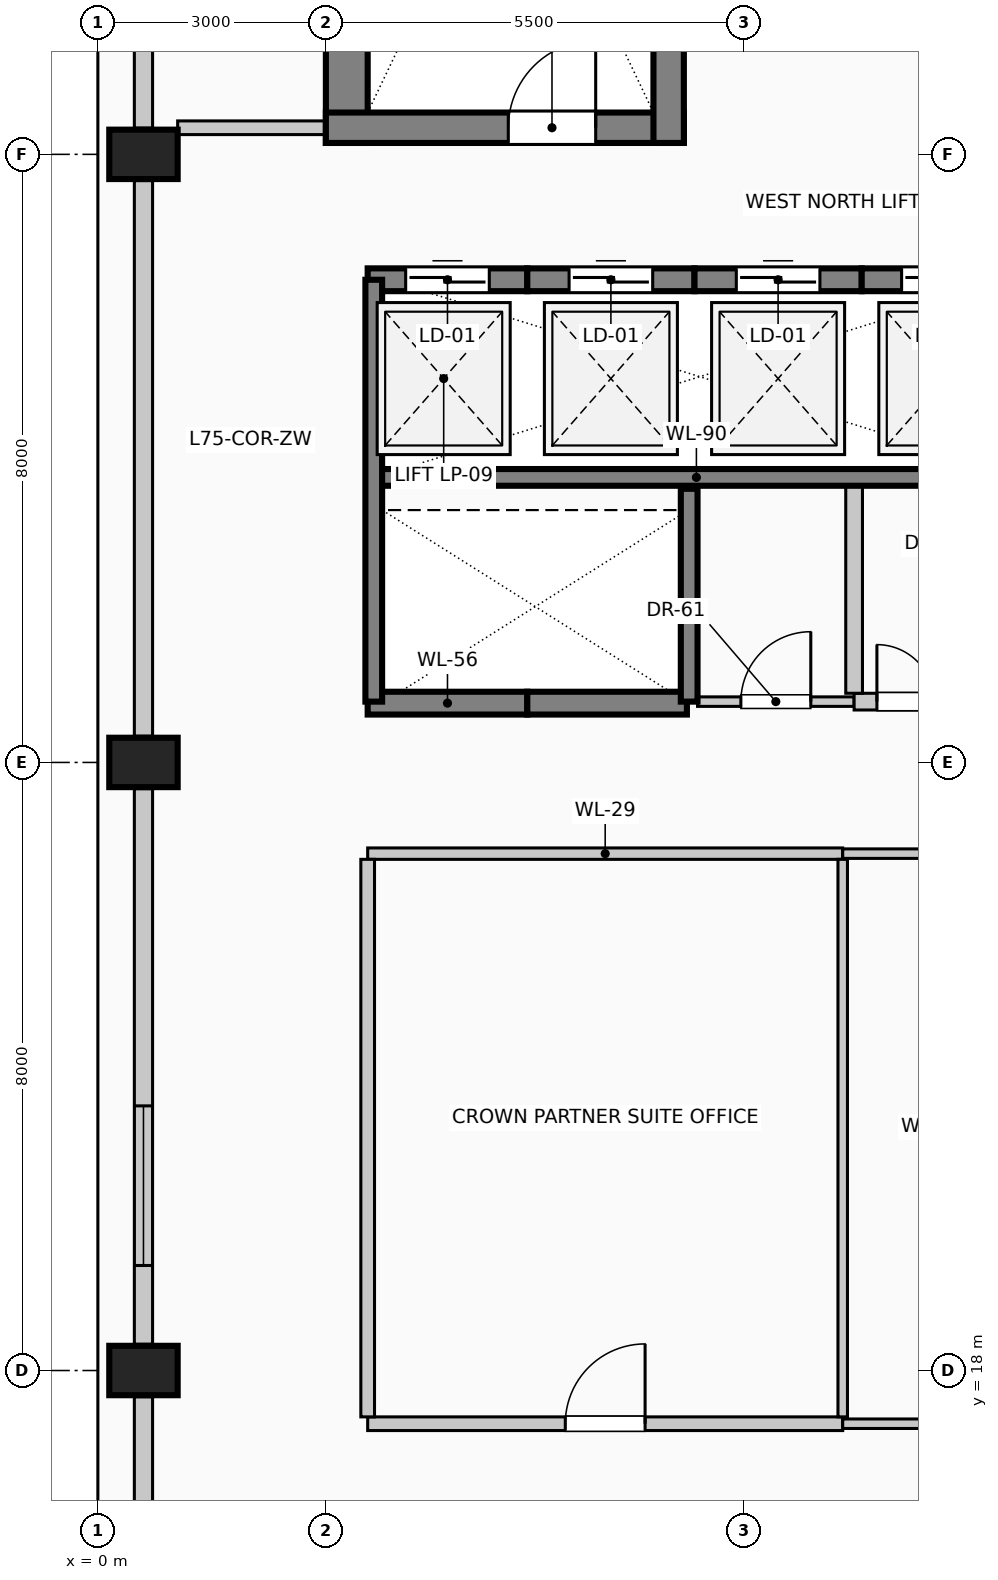
"""IFC4 building model, lengths in metres.
Left out: names, types, materials, properties, quantities, classifications, styles, units other than length and angle.
Written with IfcOpenShell. Run it as: python <this file> out.ifc"""

import sys

from ifc_helpers import new_model, si_unit, direction, frame, frame_2d, origin, origin_2d, place, context, subcontext, project, spatial, rectangle, extrude, element, fill, save


model = new_model("IFC4")
c1 = context("Model", 3, precision=1e-05, world=origin(), true_north=direction((0.0, 1.0)))
c2 = subcontext(c1, "Body", "Model", "MODEL_VIEW")
j1 = project(units=[si_unit("LENGTHUNIT", "METRE"), si_unit("PLANEANGLEUNIT", "RADIAN")], contexts=[c1])
p1 = place(None, origin())
s1 = spatial("IfcSite", under=j1, at=p1, CompositionType="ELEMENT")
p2 = place(p1, origin())
s2 = spatial("IfcBuilding", under=s1, at=p2, CompositionType="ELEMENT")
p3 = place(p2, frame((0.0, 0.0, 309.0)))
s3 = spatial("IfcBuildingStorey", under=s2, at=p3, CompositionType="ELEMENT", Elevation=309.0)
p4 = place(p3, frame((3.275, 34.15, 0.0), z_axis=(0.0, 0.0, 1.0), x_axis=(0.0, 1.0, 0.0)))
e1 = element("IfcWall", 1, at=p4, inside=s3, PredefinedType="SHEAR", context=c2, shape_type="SweptSolid", body=[
    extrude(rectangle(XDim=8.83, YDim=0.55, at=frame_2d((4.415, 0.0))), origin(), (0.0, 0.0, 1.0), 4.0),
])
p5 = place(p3, frame((3.0, 34.35, 0.0), z_axis=(0.0, 0.0, 1.0), x_axis=(1.0, 0.0, 0.0)))
e2 = element("IfcWall", 2, at=p5, inside=s3, PredefinedType="SHEAR", context=c2, shape_type="SweptSolid", body=[
    extrude(rectangle(XDim=4.71, YDim=0.4, at=frame_2d((2.355, 0.0))), origin(), (0.0, 0.0, 1.0), 4.0),
])
p6 = place(p5, frame((2.4, 0.0, 0.0)))
e3 = element("IfcOpeningElement", 3, at=p6, cuts=e2, PredefinedType="OPENING", context=c2, shape_type="SweptSolid", body=[
    extrude(rectangle(XDim=1.15, YDim=2.2, at=frame_2d((0.575, 1.1))), frame((0.0, 0.21, 0.0), z_axis=(0.0, -1.0, 0.0), x_axis=(1.0, 0.0, 0.0)), (0.0, 0.0, 1.0), 0.42),
])
p7 = place(p3, frame((7.51, 34.15, 0.0), z_axis=(0.0, 0.0, 1.0), x_axis=(0.0, 1.0, 0.0)))
e4 = element("IfcWall", 4, at=p7, inside=s3, PredefinedType="SHEAR", context=c2, shape_type="SweptSolid", body=[
    extrude(rectangle(XDim=8.83, YDim=0.4, at=frame_2d((4.415, 0.0))), origin(), (0.0, 0.0, 1.0), 4.0),
])
for number, where, z_axis, x_axis in (
    (5, (0.6, 18.0, 0.0), (0.0, 0.0, 1.0), (0.0, 1.0, 0.0)),
    (6, (0.6, 26.0, 0.0), (0.0, 0.0, 1.0), (0.0, 1.0, 0.0)),
    (7, (0.6, 34.0, 0.0), (0.0, 0.0, 1.0), (0.0, 1.0, 0.0)),
):
    element("IfcColumn", number, at=place(p3, frame(where, z_axis=z_axis, x_axis=x_axis)), inside=s3, PredefinedType="COLUMN", context=c2, shape_type="SweptSolid", body=[
        extrude(rectangle(XDim=0.65, YDim=0.9, at=origin_2d()), origin(), (0.0, 0.0, 1.0), 4.0),
    ])
p8 = place(p3, frame((0.6, 10.345, 0.0), z_axis=(0.0, 0.0, 1.0), x_axis=(0.0, 1.0, 0.0)))
e8 = element("IfcWall", 8, at=p8, inside=s3, PredefinedType="SOLIDWALL", context=c2, shape_type="SweptSolid", body=[
    extrude(rectangle(XDim=7.31, YDim=0.24, at=frame_2d((3.655, 0.0))), origin(), (0.0, 0.0, 1.0), 3.025),
])
p9 = place(p8, frame((1.037, 0.0, 0.35)))
e9 = element("IfcOpeningElement", 9, at=p9, cuts=e8, PredefinedType="OPENING", context=c2, shape_type="SweptSolid", body=[
    extrude(rectangle(XDim=2.1, YDim=2.2, at=frame_2d((1.05, 1.1))), frame((0.0, 0.13, 0.0), z_axis=(0.0, -1.0, 0.0), x_axis=(1.0, 0.0, 0.0)), (0.0, 0.0, 1.0), 0.26),
])
p10 = place(p3, frame((0.6, 18.345, 0.0), z_axis=(0.0, 0.0, 1.0), x_axis=(0.0, 1.0, 0.0)))
e10 = element("IfcWall", 10, at=p10, inside=s3, PredefinedType="SOLIDWALL", context=c2, shape_type="SweptSolid", body=[
    extrude(rectangle(XDim=7.31, YDim=0.24, at=frame_2d((3.655, 0.0))), origin(), (0.0, 0.0, 1.0), 3.025),
])
p11 = place(p10, frame((1.037, 0.0, 0.35)))
e11 = element("IfcOpeningElement", 11, at=p11, cuts=e10, PredefinedType="OPENING", context=c2, shape_type="SweptSolid", body=[
    extrude(rectangle(XDim=2.1, YDim=2.2, at=frame_2d((1.05, 1.1))), frame((0.0, 0.13, 0.0), z_axis=(0.0, -1.0, 0.0), x_axis=(1.0, 0.0, 0.0)), (0.0, 0.0, 1.0), 0.26),
])
p12 = place(p3, frame((0.6, 26.345, 0.0), z_axis=(0.0, 0.0, 1.0), x_axis=(0.0, 1.0, 0.0)))
e12 = element("IfcWall", 12, at=p12, inside=s3, PredefinedType="SOLIDWALL", context=c2, shape_type="SweptSolid", body=[
    extrude(rectangle(XDim=7.31, YDim=0.24, at=frame_2d((3.655, 0.0))), origin(), (0.0, 0.0, 1.0), 3.025),
])
p13 = place(p3, frame((0.6, 34.345, 0.0), z_axis=(0.0, 0.0, 1.0), x_axis=(0.0, 1.0, 0.0)))
e13 = element("IfcWall", 13, at=p13, inside=s3, PredefinedType="SOLIDWALL", context=c2, shape_type="SweptSolid", body=[
    extrude(rectangle(XDim=7.71, YDim=0.24, at=frame_2d((3.855, 0.0))), origin(), (0.0, 0.0, 1.0), 3.025),
])
p14 = place(p3, frame((3.55, 32.35, 0.0), z_axis=(0.0, 0.0, 1.0), x_axis=(1.0, 0.0, 0.0)))
e14 = element("IfcWall", 14, at=p14, inside=s3, PredefinedType="SOLIDWALL", context=c2, shape_type="SweptSolid", body=[
    extrude(rectangle(XDim=2.1, YDim=0.3, at=frame_2d((1.05, 0.0))), origin(), (0.0, 0.0, 1.0), 4.0),
])
p15 = place(p14, frame((0.5, 0.0, 0.0)))
e15 = element("IfcOpeningElement", 15, at=p15, cuts=e14, PredefinedType="OPENING", context=c2, shape_type="SweptSolid", body=[
    extrude(rectangle(XDim=1.1, YDim=2.2, at=frame_2d((0.55, 1.1))), frame((0.0, 0.16, 0.0), z_axis=(0.0, -1.0, 0.0), x_axis=(1.0, 0.0, 0.0)), (0.0, 0.0, 1.0), 0.32),
])
p16 = place(p3, frame((5.65, 32.35, 0.0), z_axis=(0.0, 0.0, 1.0), x_axis=(1.0, 0.0, 0.0)))
e16 = element("IfcWall", 16, at=p16, inside=s3, PredefinedType="SOLIDWALL", context=c2, shape_type="SweptSolid", body=[
    extrude(rectangle(XDim=2.2, YDim=0.3, at=frame_2d((1.1, 0.0))), origin(), (0.0, 0.0, 1.0), 4.0),
])
p17 = place(p16, frame((0.55, 0.0, 0.0)))
e17 = element("IfcOpeningElement", 17, at=p17, cuts=e16, PredefinedType="OPENING", context=c2, shape_type="SweptSolid", body=[
    extrude(rectangle(XDim=1.1, YDim=2.2, at=frame_2d((0.55, 1.1))), frame((0.0, 0.16, 0.0), z_axis=(0.0, -1.0, 0.0), x_axis=(1.0, 0.0, 0.0)), (0.0, 0.0, 1.0), 0.32),
])
p18 = place(p3, frame((7.85, 32.35, 0.0), z_axis=(0.0, 0.0, 1.0), x_axis=(1.0, 0.0, 0.0)))
e18 = element("IfcWall", 18, at=p18, inside=s3, PredefinedType="SOLIDWALL", context=c2, shape_type="SweptSolid", body=[
    extrude(rectangle(XDim=2.2, YDim=0.3, at=frame_2d((1.1, 0.0))), origin(), (0.0, 0.0, 1.0), 4.0),
])
p19 = place(p18, frame((0.55, 0.0, 0.0)))
e19 = element("IfcOpeningElement", 19, at=p19, cuts=e18, PredefinedType="OPENING", context=c2, shape_type="SweptSolid", body=[
    extrude(rectangle(XDim=1.1, YDim=2.2, at=frame_2d((0.55, 1.1))), frame((0.0, 0.16, 0.0), z_axis=(0.0, -1.0, 0.0), x_axis=(1.0, 0.0, 0.0)), (0.0, 0.0, 1.0), 0.32),
])
p20 = place(p3, frame((10.05, 32.35, 0.0), z_axis=(0.0, 0.0, 1.0), x_axis=(1.0, 0.0, 0.0)))
e20 = element("IfcWall", 20, at=p20, inside=s3, PredefinedType="SOLIDWALL", context=c2, shape_type="SweptSolid", body=[
    extrude(rectangle(XDim=2.15, YDim=0.3, at=frame_2d((1.075, 0.0))), origin(), (0.0, 0.0, 1.0), 4.0),
])
p21 = place(p20, frame((0.525, 0.0, 0.0)))
e21 = element("IfcOpeningElement", 21, at=p21, cuts=e20, PredefinedType="OPENING", context=c2, shape_type="SweptSolid", body=[
    extrude(rectangle(XDim=1.1, YDim=2.2, at=frame_2d((0.55, 1.1))), frame((0.0, 0.16, 0.0), z_axis=(0.0, -1.0, 0.0), x_axis=(1.0, 0.0, 0.0)), (0.0, 0.0, 1.0), 0.32),
])
p22 = place(p3, frame((5.65, 26.78, 0.0), z_axis=(0.0, 0.0, 1.0), x_axis=(-1.0, 0.0, 0.0)))
e22 = element("IfcWall", 22, at=p22, inside=s3, PredefinedType="SOLIDWALL", context=c2, shape_type="SweptSolid", body=[
    extrude(rectangle(XDim=2.1, YDim=0.3, at=frame_2d((1.05, 0.0))), origin(), (0.0, 0.0, 1.0), 4.0),
])
p23 = place(p3, frame((7.75, 26.78, 0.0), z_axis=(0.0, 0.0, 1.0), x_axis=(-1.0, 0.0, 0.0)))
e23 = element("IfcWall", 23, at=p23, inside=s3, PredefinedType="SOLIDWALL", context=c2, shape_type="SweptSolid", body=[
    extrude(rectangle(XDim=2.1, YDim=0.3, at=frame_2d((1.05, 0.0))), origin(), (0.0, 0.0, 1.0), 4.0),
])
p24 = place(p3, frame((3.55, 29.75, 0.0), z_axis=(0.0, 0.0, 1.0), x_axis=(1.0, 0.0, 0.0)))
e24 = element("IfcWall", 24, at=p24, inside=s3, PredefinedType="SOLIDWALL", context=c2, shape_type="SweptSolid", body=[
    extrude(rectangle(XDim=8.65, YDim=0.22, at=frame_2d((4.325, 0.0))), origin(), (0.0, 0.0, 1.0), 4.0),
])
p25 = place(p3, frame((3.63, 26.8, 0.0), z_axis=(0.0, 0.0, 1.0), x_axis=(0.0, 1.0, 0.0)))
e25 = element("IfcWall", 25, at=p25, inside=s3, PredefinedType="SOLIDWALL", context=c2, shape_type="SweptSolid", body=[
    extrude(rectangle(XDim=5.55, YDim=0.22, at=frame_2d((2.775, 0.0))), origin(), (0.0, 0.0, 1.0), 4.0),
])
p26 = place(p3, frame((7.78, 26.8, 0.0), z_axis=(0.0, 0.0, 1.0), x_axis=(0.0, 1.0, 0.0)))
e26 = element("IfcWall", 26, at=p26, inside=s3, PredefinedType="SOLIDWALL", context=c2, shape_type="SweptSolid", body=[
    extrude(rectangle(XDim=2.8, YDim=0.22, at=frame_2d((1.4, 0.0))), origin(), (0.0, 0.0, 1.0), 4.0),
])
p27 = place(p3, frame((3.55, 17.3, 0.0), z_axis=(0.0, 0.0, 1.0), x_axis=(1.0, 0.0, 0.0)))
e27 = element("IfcWall", 27, at=p27, inside=s3, PredefinedType="PARTITIONING", context=c2, shape_type="SweptSolid", body=[
    extrude(rectangle(XDim=6.25, YDim=0.18, at=frame_2d((3.125, 0.0))), origin(), (0.0, 0.0, 1.0), 3.775),
])
p28 = place(p27, frame((2.6, 0.0, 0.0)))
e28 = element("IfcOpeningElement", 28, at=p28, cuts=e27, PredefinedType="OPENING", context=c2, shape_type="SweptSolid", body=[
    extrude(rectangle(XDim=1.05, YDim=2.15, at=frame_2d((0.525, 1.075))), frame((0.0, 0.1, 0.0), z_axis=(0.0, -1.0, 0.0), x_axis=(1.0, 0.0, 0.0)), (0.0, 0.0, 1.0), 0.2),
])
p29 = place(p3, frame((9.8, 17.3, 0.0), z_axis=(0.0, 0.0, 1.0), x_axis=(1.0, 0.0, 0.0)))
e29 = element("IfcWall", 29, at=p29, inside=s3, PredefinedType="PARTITIONING", context=c2, shape_type="SweptSolid", body=[
    extrude(rectangle(XDim=6.05, YDim=0.125, at=frame_2d((3.025, 0.0))), origin(), (0.0, 0.0, 1.0), 3.775),
])
p30 = place(p29, frame((2.575, 0.0, 0.0)))
e30 = element("IfcOpeningElement", 30, at=p30, cuts=e29, PredefinedType="OPENING", context=c2, shape_type="SweptSolid", body=[
    extrude(rectangle(XDim=0.9, YDim=2.1, at=frame_2d((0.45, 1.05))), frame((0.0, 0.073, 0.0), z_axis=(0.0, -1.0, 0.0), x_axis=(1.0, 0.0, 0.0)), (0.0, 0.0, 1.0), 0.145),
])
p31 = place(p3, frame((3.55, 24.8, 0.0), z_axis=(0.0, 0.0, 1.0), x_axis=(1.0, 0.0, 0.0)))
e31 = element("IfcWall", 31, at=p31, inside=s3, PredefinedType="PARTITIONING", context=c2, shape_type="SweptSolid", body=[
    extrude(rectangle(XDim=6.25, YDim=0.15, at=frame_2d((3.125, 0.0))), origin(), (0.0, 0.0, 1.0), 3.775),
])
p32 = place(p3, frame((9.8, 24.8, 0.0), z_axis=(0.0, 0.0, 1.0), x_axis=(1.0, 0.0, 0.0)))
e32 = element("IfcWall", 32, at=p32, inside=s3, PredefinedType="PARTITIONING", context=c2, shape_type="SweptSolid", body=[
    extrude(rectangle(XDim=2.4, YDim=0.125, at=frame_2d((1.2, 0.0))), origin(), (0.0, 0.0, 1.0), 3.775),
])
p33 = place(p3, frame((7.89, 26.8, 0.0), z_axis=(0.0, 0.0, 1.0), x_axis=(1.0, 0.0, 0.0)))
e33 = element("IfcWall", 33, at=p33, inside=s3, PredefinedType="PARTITIONING", context=c2, shape_type="SweptSolid", body=[
    extrude(rectangle(XDim=2.06, YDim=0.125, at=frame_2d((1.03, 0.0))), origin(), (0.0, 0.0, 1.0), 3.775),
])
p34 = place(p33, frame((0.57, 0.0, 0.0)))
e34 = element("IfcOpeningElement", 34, at=p34, cuts=e33, PredefinedType="OPENING", context=c2, shape_type="SweptSolid", body=[
    extrude(rectangle(XDim=0.92, YDim=2.1, at=frame_2d((0.46, 1.05))), frame((0.0, 0.073, 0.0), z_axis=(0.0, -1.0, 0.0), x_axis=(1.0, 0.0, 0.0)), (0.0, 0.0, 1.0), 0.145),
])
p35 = place(p3, frame((9.95, 26.8, 0.0), z_axis=(0.0, 0.0, 1.0), x_axis=(1.0, 0.0, 0.0)))
e35 = element("IfcWall", 35, at=p35, inside=s3, PredefinedType="PARTITIONING", context=c2, shape_type="SweptSolid", body=[
    extrude(rectangle(XDim=2.1, YDim=0.22, at=frame_2d((1.05, 0.0))), origin(), (0.0, 0.0, 1.0), 3.775),
])
p36 = place(p35, frame((0.3, 0.0, 0.0)))
e36 = element("IfcOpeningElement", 36, at=p36, cuts=e35, PredefinedType="OPENING", context=c2, shape_type="SweptSolid", body=[
    extrude(rectangle(XDim=1.5, YDim=2.25, at=frame_2d((0.75, 1.125))), frame((0.0, 0.12, 0.0), z_axis=(0.0, -1.0, 0.0), x_axis=(1.0, 0.0, 0.0)), (0.0, 0.0, 1.0), 0.24),
])
p37 = place(p3, frame((1.05, 34.35, 0.0), z_axis=(0.0, 0.0, 1.0), x_axis=(1.0, 0.0, 0.0)))
e37 = element("IfcWall", 37, at=p37, inside=s3, PredefinedType="PARTITIONING", context=c2, shape_type="SweptSolid", body=[
    extrude(rectangle(XDim=1.95, YDim=0.18, at=frame_2d((0.975, 0.0))), origin(), (0.0, 0.0, 1.0), 3.775),
])
p38 = place(p3, frame((3.55, 17.39, 0.0), z_axis=(0.0, 0.0, 1.0), x_axis=(0.0, 1.0, 0.0)))
e38 = element("IfcWall", 38, at=p38, inside=s3, PredefinedType="PARTITIONING", context=c2, shape_type="SweptSolid", body=[
    extrude(rectangle(XDim=7.335, YDim=0.18, at=frame_2d((3.667, 0.0))), origin(), (0.0, 0.0, 1.0), 3.775),
])
p39 = place(p3, frame((9.8, 17.39, 0.0), z_axis=(0.0, 0.0, 1.0), x_axis=(0.0, 1.0, 0.0)))
e39 = element("IfcWall", 39, at=p39, inside=s3, PredefinedType="PARTITIONING", context=c2, shape_type="SweptSolid", body=[
    extrude(rectangle(XDim=7.335, YDim=0.125, at=frame_2d((3.667, 0.0))), origin(), (0.0, 0.0, 1.0), 3.775),
])
p40 = place(p3, frame((9.95, 26.91, 0.0), z_axis=(0.0, 0.0, 1.0), x_axis=(0.0, 1.0, 0.0)))
e40 = element("IfcWall", 40, at=p40, inside=s3, PredefinedType="PARTITIONING", context=c2, shape_type="SweptSolid", body=[
    extrude(rectangle(XDim=2.73, YDim=0.22, at=frame_2d((1.365, 0.0))), origin(), (0.0, 0.0, 1.0), 3.775),
])
p41 = place(p11, origin())
e41 = element("IfcWindow", 41, at=p41, inside=s3, PartitioningType="SINGLE_PANEL", PredefinedType="WINDOW", context=c2, shape_type="SweptSolid", body=[
    extrude(rectangle(XDim=2.1, YDim=2.2, at=frame_2d((1.05, 1.1))), frame((0.0, 0.03, 0.0), z_axis=(0.0, -1.0, 0.0), x_axis=(1.0, 0.0, 0.0)), (0.0, 0.0, 1.0), 0.06),
])
fill(e11, e41)
p42 = place(p15, origin())
e42 = element("IfcDoor", 42, at=p42, inside=s3, OperationType="SLIDING_TO_LEFT", PredefinedType="DOOR", context=c2, shape_type="SweptSolid", body=[
    extrude(rectangle(XDim=1.1, YDim=2.2, at=frame_2d((0.55, 1.1))), frame((0.0, 0.025, 0.0), z_axis=(0.0, -1.0, 0.0), x_axis=(1.0, 0.0, 0.0)), (0.0, 0.0, 1.0), 0.05),
])
fill(e15, e42)
p43 = place(p17, origin())
e43 = element("IfcDoor", 43, at=p43, inside=s3, OperationType="SLIDING_TO_RIGHT", PredefinedType="DOOR", context=c2, shape_type="SweptSolid", body=[
    extrude(rectangle(XDim=1.1, YDim=2.2, at=frame_2d((0.55, 1.1))), frame((0.0, 0.025, 0.0), z_axis=(0.0, -1.0, 0.0), x_axis=(1.0, 0.0, 0.0)), (0.0, 0.0, 1.0), 0.05),
])
fill(e17, e43)
p44 = place(p19, origin())
e44 = element("IfcDoor", 44, at=p44, inside=s3, OperationType="SLIDING_TO_LEFT", PredefinedType="DOOR", context=c2, shape_type="SweptSolid", body=[
    extrude(rectangle(XDim=1.1, YDim=2.2, at=frame_2d((0.55, 1.1))), frame((0.0, 0.025, 0.0), z_axis=(0.0, -1.0, 0.0), x_axis=(1.0, 0.0, 0.0)), (0.0, 0.0, 1.0), 0.05),
])
fill(e19, e44)
p45 = place(p21, origin())
e45 = element("IfcDoor", 45, at=p45, inside=s3, OperationType="SLIDING_TO_RIGHT", PredefinedType="DOOR", context=c2, shape_type="SweptSolid", body=[
    extrude(rectangle(XDim=1.1, YDim=2.2, at=frame_2d((0.55, 1.1))), frame((0.0, 0.025, 0.0), z_axis=(0.0, -1.0, 0.0), x_axis=(1.0, 0.0, 0.0)), (0.0, 0.0, 1.0), 0.05),
])
fill(e21, e45)
p46 = place(p6, origin())
e46 = element("IfcDoor", 46, at=p46, inside=s3, OperationType="SINGLE_SWING_RIGHT", PredefinedType="DOOR", context=c2, shape_type="SweptSolid", body=[
    extrude(rectangle(XDim=1.15, YDim=2.2, at=frame_2d((0.575, 1.1))), frame((0.0, 0.025, 0.0), z_axis=(0.0, -1.0, 0.0), x_axis=(1.0, 0.0, 0.0)), (0.0, 0.0, 1.0), 0.05),
])
fill(e3, e46)
p47 = place(p28, origin())
e47 = element("IfcDoor", 47, at=p47, inside=s3, OperationType="SINGLE_SWING_RIGHT", PredefinedType="DOOR", context=c2, shape_type="SweptSolid", body=[
    extrude(rectangle(XDim=1.05, YDim=2.15, at=frame_2d((0.525, 1.075))), frame((0.0, 0.025, 0.0), z_axis=(0.0, -1.0, 0.0), x_axis=(1.0, 0.0, 0.0)), (0.0, 0.0, 1.0), 0.05),
])
fill(e28, e47)
p48 = place(p34, origin())
e48 = element("IfcDoor", 48, at=p48, inside=s3, OperationType="SINGLE_SWING_RIGHT", PredefinedType="DOOR", context=c2, shape_type="SweptSolid", body=[
    extrude(rectangle(XDim=0.92, YDim=2.1, at=frame_2d((0.46, 1.05))), frame((0.0, 0.025, 0.0), z_axis=(0.0, -1.0, 0.0), x_axis=(1.0, 0.0, 0.0)), (0.0, 0.0, 1.0), 0.05),
])
fill(e34, e48)
p49 = place(p36, origin())
e49 = element("IfcDoor", 49, at=p49, inside=s3, OperationType="DOUBLE_DOOR_SINGLE_SWING", PredefinedType="DOOR", context=c2, shape_type="SweptSolid", body=[
    extrude(rectangle(XDim=1.5, YDim=2.25, at=frame_2d((0.75, 1.125))), frame((0.0, 0.025, 0.0), z_axis=(0.0, -1.0, 0.0), x_axis=(1.0, 0.0, 0.0)), (0.0, 0.0, 1.0), 0.05),
])
fill(e36, e49)
save(model, sys.argv[1])
